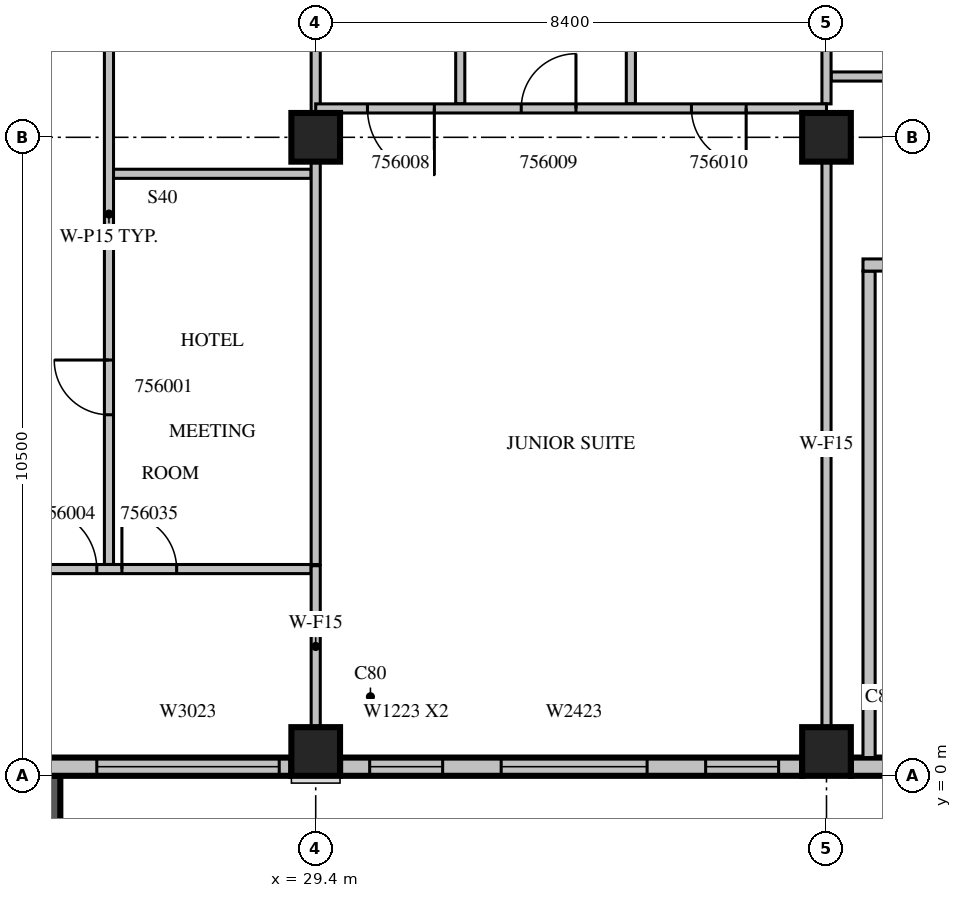
"""IFC4 building model, lengths in metres.
Left out: names, types, materials, properties, quantities, classifications, styles, units other than length and angle.
Written with IfcOpenShell. Run it as: python <this file> out.ifc"""

import sys

from ifc_helpers import new_model, si_unit, direction, frame, frame_2d, origin, origin_2d, place, context, subcontext, project, spatial, rectangle, extrude, source, transform, mapped, element, fill, save


model = new_model("IFC4")
c1 = context("Model", 3, precision=1e-05, world=origin(), true_north=direction((0.0, 1.0)))
c2 = subcontext(c1, "Body", "Model", "MODEL_VIEW")
j1 = project(units=[si_unit("LENGTHUNIT", "METRE"), si_unit("PLANEANGLEUNIT", "RADIAN")], contexts=[c1])
p1 = place(None, origin())
s1 = spatial("IfcSite", under=j1, at=p1, CompositionType="ELEMENT")
p2 = place(p1, origin())
s2 = spatial("IfcBuilding", under=s1, at=p2, CompositionType="ELEMENT")
p3 = place(p2, frame((0.0, 0.0, 246.2)))
s3 = spatial("IfcBuildingStorey", under=s2, at=p3, CompositionType="ELEMENT", Elevation=246.2)
m1 = source(origin(), c2, "Body", "SweptSolid", [
    extrude(rectangle(XDim=0.8, YDim=0.8, at=origin_2d()), origin(), (0.0, 0.0, 1.0), 3.8),
])
for number, where, z_axis, x_axis in (
    (1, (29.4, 0.4, 0.0), (0.0, 0.0, 1.0), (1.0, 0.0, 0.0)),
    (2, (37.8, 0.4, 0.0), (0.0, 0.0, 1.0), (1.0, 0.0, 0.0)),
    (3, (29.4, 10.5, 0.0), (0.0, 0.0, 1.0), (1.0, 0.0, 0.0)),
    (4, (37.8, 10.5, 0.0), (0.0, 0.0, 1.0), (1.0, 0.0, 0.0)),
):
    element("IfcColumn", number, at=place(p3, frame(where, z_axis=z_axis, x_axis=x_axis)), inside=s3, PredefinedType="COLUMN", context=c2, shape_type="MappedRepresentation", body=[
        mapped(m1, transform((0.0, 0.0, 0.0), scale=1.0)),
    ])
m2 = source(origin(), c2, "Body", "SweptSolid", [
    extrude(rectangle(XDim=3.9, YDim=0.2, at=frame_2d((1.95, 0.0))), origin(), (0.0, 0.0, 1.0), 3.4),
])
p4 = place(p3, frame((25.1, 0.0, 0.0), z_axis=(0.0, 0.0, 1.0), x_axis=(0.0, -1.0, 0.0)))
e5 = element("IfcWall", 5, at=p4, inside=s3, PredefinedType="SOLIDWALL", context=c2, shape_type="MappedRepresentation", body=[
    mapped(m2, transform((0.0, 0.0, 0.0), scale=1.0)),
])
m3 = source(origin(), c2, "Body", "SweptSolid", [
    extrude(rectangle(XDim=2.4, YDim=2.3, at=frame_2d((1.2, 1.15))), frame((0.0, 0.11, 0.0), z_axis=(0.0, -1.0, 0.0), x_axis=(1.0, 0.0, 0.0)), (0.0, 0.0, 1.0), 0.22),
])
p5 = place(p4, frame((0.75, 0.0, 0.6)))
e6 = element("IfcOpeningElement", 6, at=p5, cuts=e5, PredefinedType="OPENING", context=c2, shape_type="MappedRepresentation", body=[
    mapped(m3, transform((0.0, 0.0, 0.0), scale=1.0)),
])
m4 = source(origin(), c2, "Body", "SweptSolid", [
    extrude(rectangle(XDim=7.6, YDim=0.3, at=frame_2d((3.8, 0.0))), origin(), (0.0, 0.0, 1.0), 3.4),
])
p6 = place(p3, frame((21.4, 0.15, 0.0), z_axis=(0.0, 0.0, 1.0), x_axis=(1.0, 0.0, 0.0)))
e7 = element("IfcWall", 7, at=p6, inside=s3, PredefinedType="STANDARD", context=c2, shape_type="MappedRepresentation", body=[
    mapped(m4, transform((0.0, 0.0, 0.0), scale=1.0)),
])
m5 = source(origin(), c2, "Body", "SweptSolid", [
    extrude(rectangle(XDim=3.0, YDim=2.3, at=frame_2d((1.5, 1.15))), frame((0.0, 0.16, 0.0), z_axis=(0.0, -1.0, 0.0), x_axis=(1.0, 0.0, 0.0)), (0.0, 0.0, 1.0), 0.32),
])
p7 = place(p6, frame((4.4, 0.0, 0.6)))
e8 = element("IfcOpeningElement", 8, at=p7, cuts=e7, PredefinedType="OPENING", context=c2, shape_type="MappedRepresentation", body=[
    mapped(m5, transform((0.0, 0.0, 0.0), scale=1.0)),
])
m6 = source(origin(), c2, "Body", "SweptSolid", [
    extrude(rectangle(XDim=1.0, YDim=2.1, at=frame_2d((0.5, 1.05))), frame((0.0, 0.16, 0.0), z_axis=(0.0, -1.0, 0.0), x_axis=(1.0, 0.0, 0.0)), (0.0, 0.0, 1.0), 0.32),
])
p8 = place(p6, frame((1.2, 0.0, 0.0)))
e9 = element("IfcOpeningElement", 9, at=p8, cuts=e7, PredefinedType="OPENING", context=c2, shape_type="MappedRepresentation", body=[
    mapped(m6, transform((0.0, 0.0, 0.0), scale=1.0)),
])
p9 = place(p3, frame((29.8, 0.15, 0.0), z_axis=(0.0, 0.0, 1.0), x_axis=(1.0, 0.0, 0.0)))
e10 = element("IfcWall", 10, at=p9, inside=s3, PredefinedType="STANDARD", context=c2, shape_type="MappedRepresentation", body=[
    mapped(m4, transform((0.0, 0.0, 0.0), scale=1.0)),
])
m7 = source(origin(), c2, "Body", "SweptSolid", [
    extrude(rectangle(XDim=1.2, YDim=2.3, at=frame_2d((0.6, 1.15))), frame((0.0, 0.16, 0.0), z_axis=(0.0, -1.0, 0.0), x_axis=(1.0, 0.0, 0.0)), (0.0, 0.0, 1.0), 0.32),
])
p10 = place(p9, frame((0.487, 0.0, 0.6)))
e11 = element("IfcOpeningElement", 11, at=p10, cuts=e10, PredefinedType="OPENING", context=c2, shape_type="MappedRepresentation", body=[
    mapped(m7, transform((0.0, 0.0, 0.0), scale=1.0)),
])
p11 = place(p9, frame((6.013, 0.0, 0.6)))
e12 = element("IfcOpeningElement", 12, at=p11, cuts=e10, PredefinedType="OPENING", context=c2, shape_type="MappedRepresentation", body=[
    mapped(m7, transform((0.0, 0.0, 0.0), scale=1.0)),
])
m8 = source(origin(), c2, "Body", "SweptSolid", [
    extrude(rectangle(XDim=2.4, YDim=2.3, at=frame_2d((1.2, 1.15))), frame((0.0, 0.16, 0.0), z_axis=(0.0, -1.0, 0.0), x_axis=(1.0, 0.0, 0.0)), (0.0, 0.0, 1.0), 0.32),
])
p12 = place(p9, frame((2.65, 0.0, 0.6)))
e13 = element("IfcOpeningElement", 13, at=p12, cuts=e10, PredefinedType="OPENING", context=c2, shape_type="MappedRepresentation", body=[
    mapped(m8, transform((0.0, 0.0, 0.0), scale=1.0)),
])
m9 = source(origin(), c2, "Body", "SweptSolid", [
    extrude(rectangle(XDim=2.0, YDim=0.3, at=frame_2d((1.0, 0.0))), origin(), (0.0, 0.0, 1.0), 3.4),
])
p13 = place(p3, frame((38.2, 0.15, 0.0), z_axis=(0.0, 0.0, 1.0), x_axis=(1.0, 0.0, 0.0)))
e14 = element("IfcWall", 14, at=p13, inside=s3, PredefinedType="STANDARD", context=c2, shape_type="MappedRepresentation", body=[
    mapped(m9, transform((0.0, 0.0, 0.0), scale=1.0)),
])
m10 = source(origin(), c2, "Body", "SweptSolid", [
    extrude(rectangle(XDim=8.0, YDim=0.2, at=frame_2d((4.0, 0.0))), origin(), (0.0, 0.0, 1.0), 3.4),
])
p14 = place(p3, frame((38.5, 0.3, 0.0), z_axis=(0.0, 0.0, 1.0), x_axis=(0.0, 1.0, 0.0)))
e15 = element("IfcWall", 15, at=p14, inside=s3, PredefinedType="PARTITIONING", context=c2, shape_type="MappedRepresentation", body=[
    mapped(m10, transform((0.0, 0.0, 0.0), scale=1.0)),
])
m11 = source(origin(), c2, "Body", "SweptSolid", [
    extrude(rectangle(XDim=5.45, YDim=0.2, at=frame_2d((2.725, 0.0))), origin(), (0.0, 0.0, 1.0), 3.4),
])
p15 = place(p3, frame((38.4, 8.4, 0.0), z_axis=(0.0, 0.0, 1.0), x_axis=(1.0, 0.0, 0.0)))
e16 = element("IfcWall", 16, at=p15, inside=s3, PredefinedType="PARTITIONING", context=c2, shape_type="MappedRepresentation", body=[
    mapped(m11, transform((0.0, 0.0, 0.0), scale=1.0)),
])
m12 = source(origin(), c2, "Body", "SweptSolid", [
    extrude(rectangle(XDim=1.2, YDim=2.1, at=frame_2d((0.6, 1.05))), frame((0.0, 0.11, 0.0), z_axis=(0.0, -1.0, 0.0), x_axis=(1.0, 0.0, 0.0)), (0.0, 0.0, 1.0), 0.22),
])
p16 = place(p15, frame((0.4, 0.0, 0.0)))
e17 = element("IfcOpeningElement", 17, at=p16, cuts=e16, PredefinedType="OPENING", context=c2, shape_type="MappedRepresentation", body=[
    mapped(m12, transform((0.0, 0.0, 0.0), scale=1.0)),
])
m13 = source(origin(), c2, "Body", "SweptSolid", [
    extrude(rectangle(XDim=0.9, YDim=2.1, at=frame_2d((0.45, 1.05))), frame((0.0, 0.11, 0.0), z_axis=(0.0, -1.0, 0.0), x_axis=(1.0, 0.0, 0.0)), (0.0, 0.0, 1.0), 0.22),
])
p17 = place(p15, frame((3.25, 0.0, 0.0)))
e18 = element("IfcOpeningElement", 18, at=p17, cuts=e16, PredefinedType="OPENING", context=c2, shape_type="MappedRepresentation", body=[
    mapped(m13, transform((0.0, 0.0, 0.0), scale=1.0)),
])
m14 = source(origin(), c2, "Body", "SweptSolid", [
    extrude(rectangle(XDim=11.525, YDim=0.15, at=frame_2d((5.763, 0.0))), origin(), (0.0, 0.0, 1.0), 3.4),
])
p18 = place(p3, frame((26.0, 15.0, 0.0), z_axis=(0.0, 0.0, 1.0), x_axis=(0.0, -1.0, 0.0)))
e19 = element("IfcWall", 19, at=p18, inside=s3, PredefinedType="PARTITIONING", context=c2, shape_type="MappedRepresentation", body=[
    mapped(m14, transform((0.0, 0.0, 0.0), scale=1.0)),
])
m15 = source(origin(), c2, "Body", "SweptSolid", [
    extrude(rectangle(XDim=0.9, YDim=2.1, at=frame_2d((0.45, 1.05))), frame((0.0, 0.085, 0.0), z_axis=(0.0, -1.0, 0.0), x_axis=(1.0, 0.0, 0.0)), (0.0, 0.0, 1.0), 0.17),
])
p19 = place(p18, frame((8.162, 0.0, 0.0)))
e20 = element("IfcOpeningElement", 20, at=p19, cuts=e19, PredefinedType="OPENING", context=c2, shape_type="MappedRepresentation", body=[
    mapped(m15, transform((0.0, 0.0, 0.0), scale=1.0)),
])
p20 = place(p18, frame((1.525, 0.0, 0.0)))
e21 = element("IfcOpeningElement", 21, at=p20, cuts=e19, PredefinedType="OPENING", context=c2, shape_type="MappedRepresentation", body=[
    mapped(m15, transform((0.0, 0.0, 0.0), scale=1.0)),
])
p21 = place(p3, frame((29.325, 9.9, 0.0), z_axis=(0.0, 0.0, 1.0), x_axis=(-1.0, 0.0, 0.0)))
e22 = element("IfcWall", 22, at=p21, inside=s3, PredefinedType="PARTITIONING", context=c2, shape_type="SweptSolid", body=[
    extrude(rectangle(XDim=3.25, YDim=0.15, at=frame_2d((1.625, 0.0))), origin(), (0.0, 0.0, 1.0), 3.4),
])
m16 = source(origin(), c2, "Body", "SweptSolid", [
    extrude(rectangle(XDim=6.626, YDim=0.15, at=frame_2d((3.313, 0.0))), origin(), (0.0, 0.0, 1.0), 3.4),
])
p22 = place(p3, frame((29.4, 3.475, 0.0), z_axis=(0.0, 0.0, 1.0), x_axis=(0.0, 1.0, 0.0)))
e23 = element("IfcWall", 23, at=p22, inside=s3, PredefinedType="PARTITIONING", context=c2, shape_type="MappedRepresentation", body=[
    mapped(m16, transform((0.0, 0.0, 0.0), scale=1.0)),
])
m17 = source(origin(), c2, "Body", "SweptSolid", [
    extrude(rectangle(XDim=4.101, YDim=0.15, at=frame_2d((2.05, 0.0))), origin(), (0.0, 0.0, 1.0), 3.4),
])
p23 = place(p3, frame((29.4, 10.899, 0.0), z_axis=(0.0, 0.0, 1.0), x_axis=(0.0, 1.0, 0.0)))
e24 = element("IfcWall", 24, at=p23, inside=s3, PredefinedType="PARTITIONING", context=c2, shape_type="MappedRepresentation", body=[
    mapped(m17, transform((0.0, 0.0, 0.0), scale=1.0)),
])
m18 = source(origin(), c2, "Body", "SweptSolid", [
    extrude(rectangle(XDim=7.525, YDim=0.15, at=frame_2d((3.763, 0.0))), origin(), (0.0, 0.0, 1.0), 3.4),
])
p24 = place(p3, frame((21.8, 3.4, 0.0), z_axis=(0.0, 0.0, 1.0), x_axis=(1.0, 0.0, 0.0)))
e25 = element("IfcWall", 25, at=p24, inside=s3, PredefinedType="PARTITIONING", context=c2, shape_type="MappedRepresentation", body=[
    mapped(m18, transform((0.0, 0.0, 0.0), scale=1.0)),
])
m19 = source(origin(), c2, "Body", "SweptSolid", [
    extrude(rectangle(XDim=1.0, YDim=2.1, at=frame_2d((0.5, 1.05))), frame((0.0, 0.085, 0.0), z_axis=(0.0, -1.0, 0.0), x_axis=(1.0, 0.0, 0.0)), (0.0, 0.0, 1.0), 0.17),
])
p25 = place(p24, frame((3.0, 0.0, 0.0)))
e26 = element("IfcOpeningElement", 26, at=p25, cuts=e25, PredefinedType="OPENING", context=c2, shape_type="MappedRepresentation", body=[
    mapped(m19, transform((0.0, 0.0, 0.0), scale=1.0)),
])
p26 = place(p24, frame((4.413, 0.0, 0.0)))
e27 = element("IfcOpeningElement", 27, at=p26, cuts=e25, PredefinedType="OPENING", context=c2, shape_type="MappedRepresentation", body=[
    mapped(m15, transform((0.0, 0.0, 0.0), scale=1.0)),
])
m20 = source(origin(), c2, "Body", "SweptSolid", [
    extrude(rectangle(XDim=6.45, YDim=0.15, at=frame_2d((3.225, 0.0))), origin(), (0.0, 0.0, 1.0), 3.4),
])
p27 = place(p3, frame((37.875, 11.5, 0.0), z_axis=(0.0, 0.0, 1.0), x_axis=(1.0, 0.0, 0.0)))
e28 = element("IfcWall", 28, at=p27, inside=s3, PredefinedType="PARTITIONING", context=c2, shape_type="MappedRepresentation", body=[
    mapped(m20, transform((0.0, 0.0, 0.0), scale=1.0)),
])
m21 = source(origin(), c2, "Body", "SweptSolid", [
    extrude(rectangle(XDim=3.95, YDim=0.15, at=frame_2d((1.975, 0.0))), origin(), (0.0, 0.0, 1.0), 3.4),
])
for number, where, z_axis, x_axis in (
    (29, (31.777, 11.05, 0.0), (0.0, 0.0, 1.0), (0.0, 1.0, 0.0)),
    (30, (34.583, 11.05, 0.0), (0.0, 0.0, 1.0), (0.0, 1.0, 0.0)),
):
    element("IfcWall", number, at=place(p3, frame(where, z_axis=z_axis, x_axis=x_axis)), inside=s3, PredefinedType="PARTITIONING", context=c2, shape_type="MappedRepresentation", body=[
        mapped(m21, transform((0.0, 0.0, 0.0), scale=1.0)),
    ])
m22 = source(origin(), c2, "Body", "SweptSolid", [
    extrude(rectangle(XDim=2.656, YDim=0.15, at=frame_2d((1.328, 0.0))), origin(), (0.0, 0.0, 1.0), 3.4),
])
p28 = place(p3, frame((29.4, 0.799, 0.0), z_axis=(0.0, 0.0, 1.0), x_axis=(0.0, 1.0, 0.0)))
e31 = element("IfcWall", 31, at=p28, inside=s3, PredefinedType="PARTITIONING", context=c2, shape_type="MappedRepresentation", body=[
    mapped(m22, transform((0.0, 0.0, 0.0), scale=1.0)),
])
m23 = source(origin(), c2, "Body", "SweptSolid", [
    extrude(rectangle(XDim=9.302, YDim=0.15, at=frame_2d((4.651, 0.0))), origin(), (0.0, 0.0, 1.0), 3.4),
])
p29 = place(p3, frame((37.8, 0.799, 0.0), z_axis=(0.0, 0.0, 1.0), x_axis=(0.0, 1.0, 0.0)))
e32 = element("IfcWall", 32, at=p29, inside=s3, PredefinedType="PARTITIONING", context=c2, shape_type="MappedRepresentation", body=[
    mapped(m23, transform((0.0, 0.0, 0.0), scale=1.0)),
])
p30 = place(p3, frame((37.8, 11.05, 0.0), z_axis=(0.0, 0.0, 1.0), x_axis=(0.0, 1.0, 0.0)))
e33 = element("IfcWall", 33, at=p30, inside=s3, PredefinedType="PARTITIONING", context=c2, shape_type="MappedRepresentation", body=[
    mapped(m21, transform((0.0, 0.0, 0.0), scale=1.0)),
])
m24 = source(origin(), c2, "Body", "SweptSolid", [
    extrude(rectangle(XDim=8.4, YDim=0.15, at=frame_2d((4.2, 0.0))), origin(), (0.0, 0.0, 1.0), 3.4),
])
p31 = place(p3, frame((37.8, 10.975, 0.0), z_axis=(0.0, 0.0, 1.0), x_axis=(-1.0, 0.0, 0.0)))
e34 = element("IfcWall", 34, at=p31, inside=s3, PredefinedType="PARTITIONING", context=c2, shape_type="MappedRepresentation", body=[
    mapped(m24, transform((0.0, 0.0, 0.0), scale=1.0)),
])
m25 = source(origin(), c2, "Body", "SweptSolid", [
    extrude(rectangle(XDim=1.1, YDim=2.1, at=frame_2d((0.55, 1.05))), frame((0.0, 0.085, 0.0), z_axis=(0.0, -1.0, 0.0), x_axis=(1.0, 0.0, 0.0)), (0.0, 0.0, 1.0), 0.17),
])
p32 = place(p31, frame((6.449, 0.0, 0.0)))
e35 = element("IfcOpeningElement", 35, at=p32, cuts=e34, PredefinedType="OPENING", context=c2, shape_type="MappedRepresentation", body=[
    mapped(m25, transform((0.0, 0.0, 0.0), scale=1.0)),
])
p33 = place(p31, frame((4.12, 0.0, 0.0)))
e36 = element("IfcOpeningElement", 36, at=p33, cuts=e34, PredefinedType="OPENING", context=c2, shape_type="MappedRepresentation", body=[
    mapped(m15, transform((0.0, 0.0, 0.0), scale=1.0)),
])
p34 = place(p31, frame((1.321, 0.0, 0.0)))
e37 = element("IfcOpeningElement", 37, at=p34, cuts=e34, PredefinedType="OPENING", context=c2, shape_type="MappedRepresentation", body=[
    mapped(m15, transform((0.0, 0.0, 0.0), scale=1.0)),
])
m26 = source(origin(), c2, "Body", "SweptSolid", [
    extrude(rectangle(XDim=3.0, YDim=2.3, at=frame_2d((1.5, 1.15))), frame((0.0, 0.03, 0.0), z_axis=(0.0, -1.0, 0.0), x_axis=(1.0, 0.0, 0.0)), (0.0, 0.0, 1.0), 0.06),
])
p35 = place(p7, origin())
e38 = element("IfcWindow", 38, at=p35, inside=s3, PartitioningType="SINGLE_PANEL", PredefinedType="WINDOW", context=c2, shape_type="MappedRepresentation", body=[
    mapped(m26, transform((0.0, 0.0, 0.0), scale=1.0)),
])
fill(e8, e38)
m27 = source(origin(), c2, "Body", "SweptSolid", [
    extrude(rectangle(XDim=1.2, YDim=2.3, at=frame_2d((0.6, 1.15))), frame((0.0, 0.03, 0.0), z_axis=(0.0, -1.0, 0.0), x_axis=(1.0, 0.0, 0.0)), (0.0, 0.0, 1.0), 0.06),
])
p36 = place(p10, origin())
e39 = element("IfcWindow", 39, at=p36, inside=s3, PartitioningType="SINGLE_PANEL", PredefinedType="WINDOW", context=c2, shape_type="MappedRepresentation", body=[
    mapped(m27, transform((0.0, 0.0, 0.0), scale=1.0)),
])
fill(e11, e39)
p37 = place(p11, origin())
e40 = element("IfcWindow", 40, at=p37, inside=s3, PartitioningType="SINGLE_PANEL", PredefinedType="WINDOW", context=c2, shape_type="MappedRepresentation", body=[
    mapped(m27, transform((0.0, 0.0, 0.0), scale=1.0)),
])
fill(e12, e40)
m28 = source(origin(), c2, "Body", "SweptSolid", [
    extrude(rectangle(XDim=2.4, YDim=2.3, at=frame_2d((1.2, 1.15))), frame((0.0, 0.03, 0.0), z_axis=(0.0, -1.0, 0.0), x_axis=(1.0, 0.0, 0.0)), (0.0, 0.0, 1.0), 0.06),
])
p38 = place(p12, origin())
e41 = element("IfcWindow", 41, at=p38, inside=s3, PartitioningType="SINGLE_PANEL", PredefinedType="WINDOW", context=c2, shape_type="MappedRepresentation", body=[
    mapped(m28, transform((0.0, 0.0, 0.0), scale=1.0)),
])
fill(e13, e41)
m29 = source(origin(), c2, "Body", "SweptSolid", [
    extrude(rectangle(XDim=0.9, YDim=2.1, at=frame_2d((0.45, 1.05))), frame((0.0, 0.025, 0.0), z_axis=(0.0, -1.0, 0.0), x_axis=(1.0, 0.0, 0.0)), (0.0, 0.0, 1.0), 0.05),
])
p39 = place(p19, origin())
e42 = element("IfcDoor", 42, at=p39, inside=s3, OperationType="SINGLE_SWING_RIGHT", PredefinedType="DOOR", context=c2, shape_type="MappedRepresentation", body=[
    mapped(m29, transform((0.0, 0.0, 0.0), scale=1.0)),
])
fill(e20, e42)
m30 = source(origin(), c2, "Body", "SweptSolid", [
    extrude(rectangle(XDim=1.0, YDim=2.1, at=frame_2d((0.5, 1.05))), frame((0.0, 0.025, 0.0), z_axis=(0.0, -1.0, 0.0), x_axis=(1.0, 0.0, 0.0)), (0.0, 0.0, 1.0), 0.05),
])
p40 = place(p25, origin())
e43 = element("IfcDoor", 43, at=p40, inside=s3, OperationType="SINGLE_SWING_LEFT", PredefinedType="DOOR", context=c2, shape_type="MappedRepresentation", body=[
    mapped(m30, transform((0.0, 0.0, 0.0), scale=1.0)),
])
fill(e26, e43)
m31 = source(origin(), c2, "Body", "SweptSolid", [
    extrude(rectangle(XDim=1.1, YDim=2.1, at=frame_2d((0.55, 1.05))), frame((0.0, 0.025, 0.0), z_axis=(0.0, -1.0, 0.0), x_axis=(1.0, 0.0, 0.0)), (0.0, 0.0, 1.0), 0.05),
])
p41 = place(p32, origin())
e44 = element("IfcDoor", 44, at=p41, inside=s3, OperationType="SINGLE_SWING_LEFT", PredefinedType="DOOR", context=c2, shape_type="MappedRepresentation", body=[
    mapped(m31, transform((0.0, 0.0, 0.0), scale=1.0)),
])
fill(e35, e44)
p42 = place(p33, origin())
e45 = element("IfcDoor", 45, at=p42, inside=s3, OperationType="SINGLE_SWING_RIGHT", PredefinedType="DOOR", context=c2, shape_type="MappedRepresentation", body=[
    mapped(m29, transform((0.0, 0.0, 0.0), scale=1.0)),
])
fill(e36, e45)
p43 = place(p34, origin())
e46 = element("IfcDoor", 46, at=p43, inside=s3, OperationType="SINGLE_SWING_LEFT", PredefinedType="DOOR", context=c2, shape_type="MappedRepresentation", body=[
    mapped(m29, transform((0.0, 0.0, 0.0), scale=1.0)),
])
fill(e37, e46)
p44 = place(p26, origin())
e47 = element("IfcDoor", 47, at=p44, inside=s3, OperationType="SINGLE_SWING_LEFT", PredefinedType="DOOR", context=c2, shape_type="MappedRepresentation", body=[
    mapped(m29, transform((0.0, 0.0, 0.0), scale=1.0)),
])
fill(e27, e47)
save(model, sys.argv[1])
